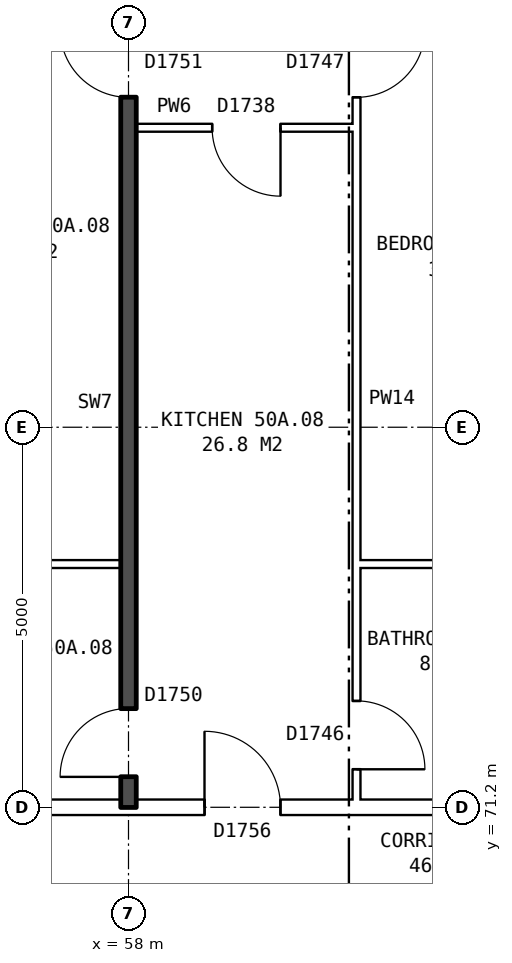
"""IFC4 building model, lengths in metres.
Left out: names, types, materials, properties, quantities, classifications, styles, units other than length and angle.
Written with IfcOpenShell. Run it as: python <this file> out.ifc"""

import sys

from ifc_helpers import new_model, si_unit, direction, frame, frame_2d, origin, place, context, subcontext, project, spatial, rectangle, extrude, element, fill, save


model = new_model("IFC4")
c1 = context("Model", 3, precision=1e-05, world=origin(), true_north=direction((0.0, 1.0)))
c2 = subcontext(c1, "Body", "Model", "MODEL_VIEW")
j1 = project(units=[si_unit("LENGTHUNIT", "METRE"), si_unit("PLANEANGLEUNIT", "RADIAN")], contexts=[c1])
p1 = place(None, origin())
s1 = spatial("IfcSite", under=j1, at=p1, CompositionType="ELEMENT")
p2 = place(p1, origin())
s2 = spatial("IfcBuilding", under=s1, at=p2, CompositionType="ELEMENT")
p3 = place(p2, frame((0.0, 0.0, 178.9)))
s3 = spatial("IfcBuildingStorey", under=s2, at=p3, CompositionType="ELEMENT", Elevation=178.9)
p4 = place(p3, frame((44.36, 71.2, 0.0), z_axis=(0.0, 0.0, 1.0), x_axis=(1.0, 0.0, 0.0)))
e1 = element("IfcWall", 1, at=p4, inside=s3, PredefinedType="PARTITIONING", context=c2, shape_type="SweptSolid", body=[
    extrude(rectangle(XDim=19.28, YDim=0.2, at=frame_2d((9.64, 0.0))), origin(), (0.0, 0.0, 1.0), 2.85),
])
p5 = place(p4, frame((14.64, 0.0, 0.0)))
e2 = element("IfcOpeningElement", 2, at=p5, cuts=e1, PredefinedType="OPENING", context=c2, shape_type="SweptSolid", body=[
    extrude(rectangle(XDim=1.0, YDim=2.1, at=frame_2d((0.5, 1.05))), frame((0.0, 0.11, 0.0), z_axis=(0.0, -1.0, 0.0), x_axis=(1.0, 0.0, 0.0)), (0.0, 0.0, 1.0), 0.22),
])
p6 = place(p4, frame((5.64, 0.0, 0.0)))
e3 = element("IfcOpeningElement", 3, at=p6, cuts=e1, PredefinedType="OPENING", context=c2, shape_type="SweptSolid", body=[
    extrude(rectangle(XDim=1.0, YDim=2.1, at=frame_2d((0.5, 1.05))), frame((0.0, 0.11, 0.0), z_axis=(0.0, -1.0, 0.0), x_axis=(1.0, 0.0, 0.0)), (0.0, 0.0, 1.0), 0.22),
])
p7 = place(p3, frame((55.1, 74.4, 0.0), z_axis=(0.0, 0.0, 1.0), x_axis=(1.0, 0.0, 0.0)))
e4 = element("IfcWall", 4, at=p7, inside=s3, PredefinedType="PARTITIONING", context=c2, shape_type="SweptSolid", body=[
    extrude(rectangle(XDim=2.8, YDim=0.1, at=frame_2d((1.4, 0.0))), origin(), (0.0, 0.0, 1.0), 2.85),
])
p8 = place(p3, frame((61.0, 74.4, 0.0), z_axis=(0.0, 0.0, 1.0), x_axis=(1.0, 0.0, 0.0)))
e5 = element("IfcWall", 5, at=p8, inside=s3, PredefinedType="PARTITIONING", context=c2, shape_type="SweptSolid", body=[
    extrude(rectangle(XDim=2.64, YDim=0.1, at=frame_2d((1.32, 0.0))), origin(), (0.0, 0.0, 1.0), 2.85),
])
p9 = place(p3, frame((58.1, 80.14, 0.0), z_axis=(0.0, 0.0, 1.0), x_axis=(1.0, 0.0, 0.0)))
e6 = element("IfcWall", 6, at=p9, inside=s3, PredefinedType="PARTITIONING", context=c2, shape_type="SweptSolid", body=[
    extrude(rectangle(XDim=2.9, YDim=0.1, at=frame_2d((1.45, 0.0))), origin(), (0.0, 0.0, 1.0), 2.85),
])
p10 = place(p9, frame((1.0, 0.0, 0.0)))
e7 = element("IfcOpeningElement", 7, at=p10, cuts=e6, PredefinedType="OPENING", context=c2, shape_type="SweptSolid", body=[
    extrude(rectangle(XDim=0.9, YDim=2.1, at=frame_2d((0.45, 1.05))), frame((0.0, 0.06, 0.0), z_axis=(0.0, -1.0, 0.0), x_axis=(1.0, 0.0, 0.0)), (0.0, 0.0, 1.0), 0.12),
])
p11 = place(p3, frame((58.0, 71.2, 0.0), z_axis=(0.0, 0.0, 1.0), x_axis=(0.0, 1.0, 0.0)))
e8 = element("IfcWall", 8, at=p11, inside=s3, PredefinedType="SOLIDWALL", context=c2, shape_type="SweptSolid", body=[
    extrude(rectangle(XDim=14.44, YDim=0.2, at=frame_2d((7.22, 0.0))), origin(), (0.0, 0.0, 1.0), 2.85),
])
p12 = place(p11, frame((9.34, 0.0, 0.0)))
e9 = element("IfcOpeningElement", 9, at=p12, cuts=e8, PredefinedType="OPENING", context=c2, shape_type="SweptSolid", body=[
    extrude(rectangle(XDim=0.9, YDim=2.1, at=frame_2d((0.45, 1.05))), frame((0.0, 0.11, 0.0), z_axis=(0.0, -1.0, 0.0), x_axis=(1.0, 0.0, 0.0)), (0.0, 0.0, 1.0), 0.22),
])
p13 = place(p11, frame((0.4, 0.0, 0.0)))
e10 = element("IfcOpeningElement", 10, at=p13, cuts=e8, PredefinedType="OPENING", context=c2, shape_type="SweptSolid", body=[
    extrude(rectangle(XDim=0.9, YDim=2.1, at=frame_2d((0.45, 1.05))), frame((0.0, 0.11, 0.0), z_axis=(0.0, -1.0, 0.0), x_axis=(1.0, 0.0, 0.0)), (0.0, 0.0, 1.0), 0.22),
])
p14 = place(p3, frame((61.0, 71.3, 0.0), z_axis=(0.0, 0.0, 1.0), x_axis=(0.0, 1.0, 0.0)))
e11 = element("IfcWall", 11, at=p14, inside=s3, PredefinedType="PARTITIONING", context=c2, shape_type="SweptSolid", body=[
    extrude(rectangle(XDim=14.34, YDim=0.1, at=frame_2d((7.17, 0.0))), origin(), (0.0, 0.0, 1.0), 2.85),
])
p15 = place(p14, frame((9.24, 0.0, 0.0)))
e12 = element("IfcOpeningElement", 12, at=p15, cuts=e11, PredefinedType="OPENING", context=c2, shape_type="SweptSolid", body=[
    extrude(rectangle(XDim=0.9, YDim=2.1, at=frame_2d((0.45, 1.05))), frame((0.0, 0.06, 0.0), z_axis=(0.0, -1.0, 0.0), x_axis=(1.0, 0.0, 0.0)), (0.0, 0.0, 1.0), 0.12),
])
p16 = place(p14, frame((0.4, 0.0, 0.0)))
e13 = element("IfcOpeningElement", 13, at=p16, cuts=e11, PredefinedType="OPENING", context=c2, shape_type="SweptSolid", body=[
    extrude(rectangle(XDim=0.9, YDim=2.1, at=frame_2d((0.45, 1.05))), frame((0.0, 0.06, 0.0), z_axis=(0.0, -1.0, 0.0), x_axis=(1.0, 0.0, 0.0)), (0.0, 0.0, 1.0), 0.12),
])
p17 = place(p15, frame((0.9, 0.0, 0.0), z_axis=(0.0, 0.0, 1.0), x_axis=(-1.0, 0.0, 0.0)))
e14 = element("IfcDoor", 14, at=p17, inside=s3, OperationType="SINGLE_SWING_LEFT", PredefinedType="DOOR", context=c2, shape_type="SweptSolid", body=[
    extrude(rectangle(XDim=0.9, YDim=2.1, at=frame_2d((0.45, 1.05))), frame((0.0, 0.025, 0.0), z_axis=(0.0, -1.0, 0.0), x_axis=(1.0, 0.0, 0.0)), (0.0, 0.0, 1.0), 0.05),
])
fill(e12, e14)
p18 = place(p12, origin())
e15 = element("IfcDoor", 15, at=p18, inside=s3, OperationType="SINGLE_SWING_RIGHT", PredefinedType="DOOR", context=c2, shape_type="SweptSolid", body=[
    extrude(rectangle(XDim=0.9, YDim=2.1, at=frame_2d((0.45, 1.05))), frame((0.0, 0.025, 0.0), z_axis=(0.0, -1.0, 0.0), x_axis=(1.0, 0.0, 0.0)), (0.0, 0.0, 1.0), 0.05),
])
fill(e9, e15)
p19 = place(p5, origin())
e16 = element("IfcDoor", 16, at=p19, inside=s3, OperationType="SINGLE_SWING_LEFT", PredefinedType="DOOR", context=c2, shape_type="SweptSolid", body=[
    extrude(rectangle(XDim=1.0, YDim=2.1, at=frame_2d((0.5, 1.05))), frame((0.0, 0.025, 0.0), z_axis=(0.0, -1.0, 0.0), x_axis=(1.0, 0.0, 0.0)), (0.0, 0.0, 1.0), 0.05),
])
fill(e2, e16)
p20 = place(p10, frame((0.9, 0.0, 0.0), z_axis=(0.0, 0.0, 1.0), x_axis=(-1.0, 0.0, 0.0)))
e17 = element("IfcDoor", 17, at=p20, inside=s3, OperationType="SINGLE_SWING_LEFT", PredefinedType="DOOR", context=c2, shape_type="SweptSolid", body=[
    extrude(rectangle(XDim=0.9, YDim=2.1, at=frame_2d((0.45, 1.05))), frame((0.0, 0.025, 0.0), z_axis=(0.0, -1.0, 0.0), x_axis=(1.0, 0.0, 0.0)), (0.0, 0.0, 1.0), 0.05),
])
fill(e7, e17)
p21 = place(p16, frame((0.9, 0.0, 0.0), z_axis=(0.0, 0.0, 1.0), x_axis=(-1.0, 0.0, 0.0)))
e18 = element("IfcDoor", 18, at=p21, inside=s3, OperationType="SINGLE_SWING_RIGHT", PredefinedType="DOOR", context=c2, shape_type="SweptSolid", body=[
    extrude(rectangle(XDim=0.9, YDim=2.1, at=frame_2d((0.45, 1.05))), frame((0.0, 0.025, 0.0), z_axis=(0.0, -1.0, 0.0), x_axis=(1.0, 0.0, 0.0)), (0.0, 0.0, 1.0), 0.05),
])
fill(e13, e18)
p22 = place(p13, origin())
e19 = element("IfcDoor", 19, at=p22, inside=s3, OperationType="SINGLE_SWING_LEFT", PredefinedType="DOOR", context=c2, shape_type="SweptSolid", body=[
    extrude(rectangle(XDim=0.9, YDim=2.1, at=frame_2d((0.45, 1.05))), frame((0.0, 0.025, 0.0), z_axis=(0.0, -1.0, 0.0), x_axis=(1.0, 0.0, 0.0)), (0.0, 0.0, 1.0), 0.05),
])
fill(e10, e19)
save(model, sys.argv[1])
